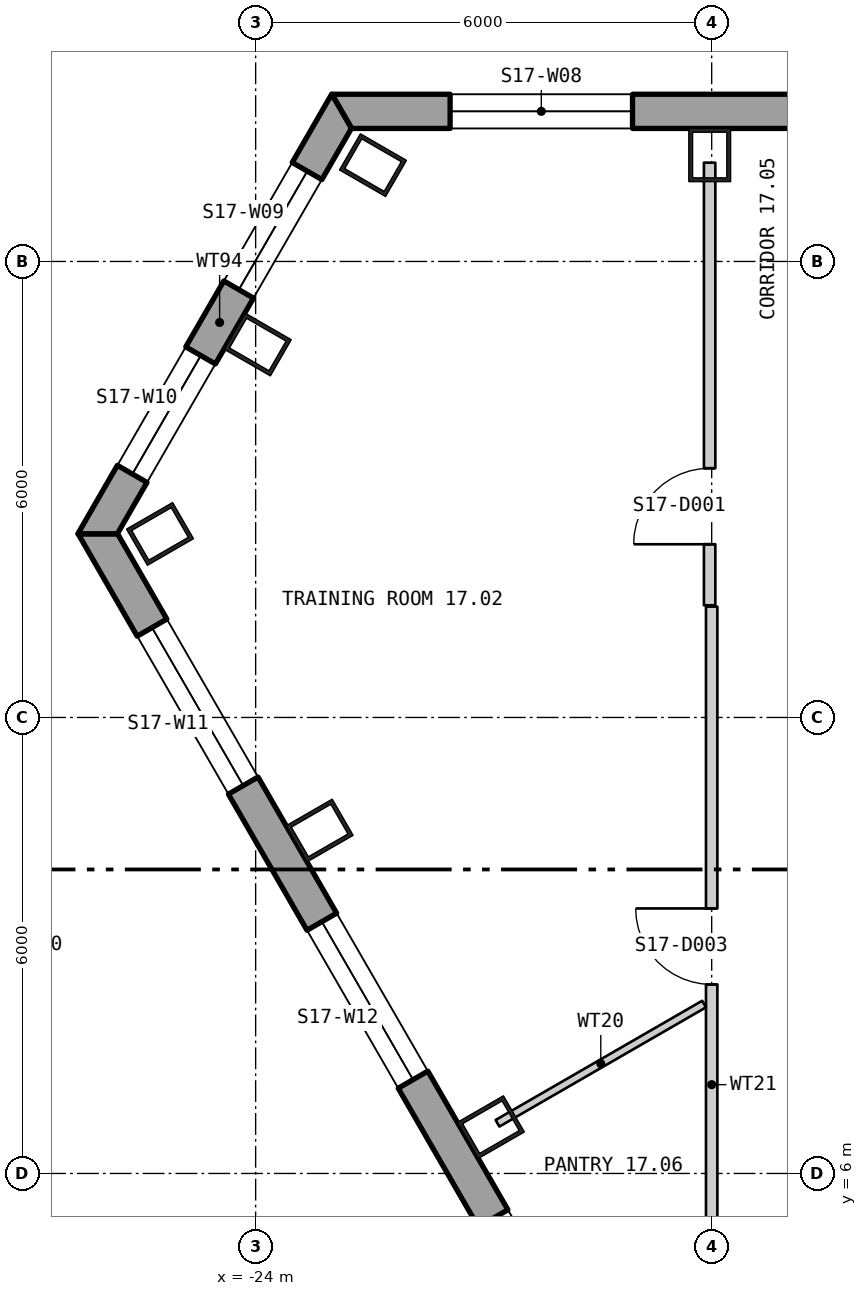
"""IFC4 building model, lengths in metres.
Left out: names, types, materials, properties, quantities, classifications, styles, units other than length and angle.
Written with IfcOpenShell. Run it as: python <this file> out.ifc"""

import sys

from ifc_helpers import new_model, si_unit, direction, frame, frame_2d, origin, origin_2d, place, context, subcontext, project, spatial, polyline, rectangle, hollow_rectangle, outline, extrude, element, fill, save


model = new_model("IFC4")
c1 = context("Model", 3, precision=1e-05, world=origin(), true_north=direction((0.0, 1.0)))
c2 = subcontext(c1, "Body", "Model", "MODEL_VIEW")
j1 = project(units=[si_unit("LENGTHUNIT", "METRE"), si_unit("PLANEANGLEUNIT", "RADIAN")], contexts=[c1])
p1 = place(None, origin())
s1 = spatial("IfcSite", under=j1, at=p1, CompositionType="ELEMENT")
p2 = place(p1, origin())
s2 = spatial("IfcBuilding", under=s1, at=p2, CompositionType="ELEMENT")
p3 = place(p2, frame((0.0, 0.0, 227.7)))
s3 = spatial("IfcBuildingStorey", under=s2, at=p3, CompositionType="ELEMENT", Elevation=227.7)
for number, where, z_axis, x_axis in (
    (1, (-18.026, 19.4, 0.0), (0.0, 0.0, 1.0), (-1.0, 0.0, 0.0)),
    (2, (-22.456, 19.267, 0.0), (0.0, 0.0, 1.0), (-0.5, -0.866, 0.0)),
    (3, (-23.972, 16.907, 0.0), (0.0, 0.0, 1.0), (-0.5, -0.866, 0.0)),
    (4, (-25.258, 14.415, 0.0), (0.0, 0.0, 1.0), (0.5, -0.866, 0.0)),
    (5, (-23.158, 10.512, 0.0), (0.0, 0.0, 1.0), (0.5, -0.866, 0.0)),
    (6, (-20.905, 6.609, 0.0), (0.0, 0.0, 1.0), (0.5, -0.866, 0.0)),
):
    element("IfcColumn", number, at=place(p3, frame(where, z_axis=z_axis, x_axis=x_axis)), inside=s3, PredefinedType="COLUMN", context=c2, shape_type="SweptSolid", body=[
        extrude(hollow_rectangle(XDim=0.55, YDim=0.7, WallThickness=0.05, at=origin_2d()), origin(), (0.0, 0.0, 1.0), 3.9),
    ])
p4 = place(p3, frame((22.865, 19.975, -0.4), z_axis=(0.0, 0.0, 1.0), x_axis=(-1.0, 0.0, 0.0)))
e7 = element("IfcWall", 7, at=p4, inside=s3, PredefinedType="SOLIDWALL", context=c2, shape_type="SweptSolid", body=[
    extrude(outline(polyline([(-0.13, -0.225), (45.86, -0.225), (45.6, 0.225), (0.13, 0.225), (-0.13, -0.225)])), origin(), (0.0, 0.0, 1.0), 3.9),
])
p5 = place(p4, frame((1.424, 0.0, 1.3)))
e8 = element("IfcOpeningElement", 8, at=p5, cuts=e7, PredefinedType="OPENING", context=c2, shape_type="SweptSolid", body=[
    extrude(rectangle(XDim=2.4, YDim=2.0, at=frame_2d((1.2, 1.0))), frame((0.0, 0.235, 0.0), z_axis=(0.0, -1.0, 0.0), x_axis=(1.0, 0.0, 0.0)), (0.0, 0.0, 1.0), 0.47),
])
p6 = place(p4, frame((10.399, 0.0, 1.3)))
e9 = element("IfcOpeningElement", 9, at=p6, cuts=e7, PredefinedType="OPENING", context=c2, shape_type="SweptSolid", body=[
    extrude(rectangle(XDim=2.4, YDim=2.0, at=frame_2d((1.2, 1.0))), frame((0.0, 0.235, 0.0), z_axis=(0.0, -1.0, 0.0), x_axis=(1.0, 0.0, 0.0)), (0.0, 0.0, 1.0), 0.47),
])
p7 = place(p4, frame((14.905, 0.0, 1.3)))
e10 = element("IfcOpeningElement", 10, at=p7, cuts=e7, PredefinedType="OPENING", context=c2, shape_type="SweptSolid", body=[
    extrude(rectangle(XDim=2.4, YDim=2.0, at=frame_2d((1.2, 1.0))), frame((0.0, 0.235, 0.0), z_axis=(0.0, -1.0, 0.0), x_axis=(1.0, 0.0, 0.0)), (0.0, 0.0, 1.0), 0.47),
])
p8 = place(p4, frame((19.412, 0.0, 1.3)))
e11 = element("IfcOpeningElement", 11, at=p8, cuts=e7, PredefinedType="OPENING", context=c2, shape_type="SweptSolid", body=[
    extrude(rectangle(XDim=2.4, YDim=2.0, at=frame_2d((1.2, 1.0))), frame((0.0, 0.235, 0.0), z_axis=(0.0, -1.0, 0.0), x_axis=(1.0, 0.0, 0.0)), (0.0, 0.0, 1.0), 0.47),
])
p9 = place(p4, frame((23.918, 0.0, 1.3)))
e12 = element("IfcOpeningElement", 12, at=p9, cuts=e7, PredefinedType="OPENING", context=c2, shape_type="SweptSolid", body=[
    extrude(rectangle(XDim=2.4, YDim=2.0, at=frame_2d((1.2, 1.0))), frame((0.0, 0.235, 0.0), z_axis=(0.0, -1.0, 0.0), x_axis=(1.0, 0.0, 0.0)), (0.0, 0.0, 1.0), 0.47),
])
p10 = place(p4, frame((28.425, 0.0, 1.3)))
e13 = element("IfcOpeningElement", 13, at=p10, cuts=e7, PredefinedType="OPENING", context=c2, shape_type="SweptSolid", body=[
    extrude(rectangle(XDim=2.4, YDim=2.0, at=frame_2d((1.2, 1.0))), frame((0.0, 0.235, 0.0), z_axis=(0.0, -1.0, 0.0), x_axis=(1.0, 0.0, 0.0)), (0.0, 0.0, 1.0), 0.47),
])
p11 = place(p4, frame((32.932, 0.0, 1.3)))
e14 = element("IfcOpeningElement", 14, at=p11, cuts=e7, PredefinedType="OPENING", context=c2, shape_type="SweptSolid", body=[
    extrude(rectangle(XDim=2.4, YDim=2.0, at=frame_2d((1.2, 1.0))), frame((0.0, 0.235, 0.0), z_axis=(0.0, -1.0, 0.0), x_axis=(1.0, 0.0, 0.0)), (0.0, 0.0, 1.0), 0.47),
])
p12 = place(p4, frame((41.907, 0.0, 1.3)))
e15 = element("IfcOpeningElement", 15, at=p12, cuts=e7, PredefinedType="OPENING", context=c2, shape_type="SweptSolid", body=[
    extrude(rectangle(XDim=2.4, YDim=2.0, at=frame_2d((1.2, 1.0))), frame((0.0, 0.235, 0.0), z_axis=(0.0, -1.0, 0.0), x_axis=(1.0, 0.0, 0.0)), (0.0, 0.0, 1.0), 0.47),
])
p13 = place(p3, frame((-22.869, 19.977, -0.4), z_axis=(0.0, 0.0, 1.0), x_axis=(-0.499997052475, -0.866027105532, 0.0)))
e16 = element("IfcWall", 16, at=p13, inside=s3, PredefinedType="SOLIDWALL", context=c2, shape_type="SweptSolid", body=[
    extrude(outline(polyline([(-0.13, -0.225), (6.55, -0.225), (6.29, 0.225), (0.13, 0.225), (-0.13, -0.225)])), origin(), (0.0, 0.0, 1.0), 3.9),
])
p14 = place(p13, frame((0.909, 0.0, 1.3)))
e17 = element("IfcOpeningElement", 17, at=p14, cuts=e16, PredefinedType="OPENING", context=c2, shape_type="SweptSolid", body=[
    extrude(rectangle(XDim=1.8, YDim=2.0, at=frame_2d((0.9, 1.0))), frame((0.0, 0.235, 0.0), z_axis=(0.0, -1.0, 0.0), x_axis=(1.0, 0.0, 0.0)), (0.0, 0.0, 1.0), 0.47),
])
p15 = place(p13, frame((3.711, 0.0, 1.3)))
e18 = element("IfcOpeningElement", 18, at=p15, cuts=e16, PredefinedType="OPENING", context=c2, shape_type="SweptSolid", body=[
    extrude(rectangle(XDim=1.8, YDim=2.0, at=frame_2d((0.9, 1.0))), frame((0.0, 0.235, 0.0), z_axis=(0.0, -1.0, 0.0), x_axis=(1.0, 0.0, 0.0)), (0.0, 0.0, 1.0), 0.47),
])
p16 = place(p3, frame((-26.075, 14.415, -0.18), z_axis=(0.0, 0.0, 1.0), x_axis=(0.499999194392, -0.866025868902, 0.0)))
e19 = element("IfcWall", 19, at=p16, inside=s3, PredefinedType="SOLIDWALL", context=c2, shape_type="SweptSolid", body=[
    extrude(outline(polyline([(-0.13, -0.225), (45.86, -0.225), (45.6, 0.225), (0.13, 0.225), (-0.13, -0.225)])), origin(), (0.0, 0.0, 1.0), 3.68),
])
p17 = place(p16, frame((1.424, 0.0, 1.08)))
e20 = element("IfcOpeningElement", 20, at=p17, cuts=e19, PredefinedType="OPENING", context=c2, shape_type="SweptSolid", body=[
    extrude(rectangle(XDim=2.4, YDim=2.0, at=frame_2d((1.2, 1.0))), frame((0.0, 0.235, 0.0), z_axis=(0.0, -1.0, 0.0), x_axis=(1.0, 0.0, 0.0)), (0.0, 0.0, 1.0), 0.47),
])
p18 = place(p16, frame((5.892, 0.0, 1.08)))
e21 = element("IfcOpeningElement", 21, at=p18, cuts=e19, PredefinedType="OPENING", context=c2, shape_type="SweptSolid", body=[
    extrude(rectangle(XDim=2.4, YDim=2.0, at=frame_2d((1.2, 1.0))), frame((0.0, 0.235, 0.0), z_axis=(0.0, -1.0, 0.0), x_axis=(1.0, 0.0, 0.0)), (0.0, 0.0, 1.0), 0.47),
])
p19 = place(p16, frame((10.399, 0.0, 1.08)))
e22 = element("IfcOpeningElement", 22, at=p19, cuts=e19, PredefinedType="OPENING", context=c2, shape_type="SweptSolid", body=[
    extrude(rectangle(XDim=2.4, YDim=2.0, at=frame_2d((1.2, 1.0))), frame((0.0, 0.235, 0.0), z_axis=(0.0, -1.0, 0.0), x_axis=(1.0, 0.0, 0.0)), (0.0, 0.0, 1.0), 0.47),
])
p20 = place(p16, frame((19.412, 0.0, 1.08)))
e23 = element("IfcOpeningElement", 23, at=p20, cuts=e19, PredefinedType="OPENING", context=c2, shape_type="SweptSolid", body=[
    extrude(rectangle(XDim=2.4, YDim=2.0, at=frame_2d((1.2, 1.0))), frame((0.0, 0.235, 0.0), z_axis=(0.0, -1.0, 0.0), x_axis=(1.0, 0.0, 0.0)), (0.0, 0.0, 1.0), 0.47),
])
p21 = place(p16, frame((23.918, 0.0, 1.08)))
e24 = element("IfcOpeningElement", 24, at=p21, cuts=e19, PredefinedType="OPENING", context=c2, shape_type="SweptSolid", body=[
    extrude(rectangle(XDim=2.4, YDim=2.0, at=frame_2d((1.2, 1.0))), frame((0.0, 0.235, 0.0), z_axis=(0.0, -1.0, 0.0), x_axis=(1.0, 0.0, 0.0)), (0.0, 0.0, 1.0), 0.47),
])
p22 = place(p16, frame((28.425, 0.0, 1.08)))
e25 = element("IfcOpeningElement", 25, at=p22, cuts=e19, PredefinedType="OPENING", context=c2, shape_type="SweptSolid", body=[
    extrude(rectangle(XDim=2.4, YDim=2.0, at=frame_2d((1.2, 1.0))), frame((0.0, 0.235, 0.0), z_axis=(0.0, -1.0, 0.0), x_axis=(1.0, 0.0, 0.0)), (0.0, 0.0, 1.0), 0.47),
])
p23 = place(p16, frame((32.932, 0.0, 1.08)))
e26 = element("IfcOpeningElement", 26, at=p23, cuts=e19, PredefinedType="OPENING", context=c2, shape_type="SweptSolid", body=[
    extrude(rectangle(XDim=2.4, YDim=2.0, at=frame_2d((1.2, 1.0))), frame((0.0, 0.235, 0.0), z_axis=(0.0, -1.0, 0.0), x_axis=(1.0, 0.0, 0.0)), (0.0, 0.0, 1.0), 0.47),
])
p24 = place(p16, frame((41.907, 0.0, 1.08)))
e27 = element("IfcOpeningElement", 27, at=p24, cuts=e19, PredefinedType="OPENING", context=c2, shape_type="SweptSolid", body=[
    extrude(rectangle(XDim=2.4, YDim=2.0, at=frame_2d((1.2, 1.0))), frame((0.0, 0.235, 0.0), z_axis=(0.0, -1.0, 0.0), x_axis=(1.0, 0.0, 0.0)), (0.0, 0.0, 1.0), 0.47),
])
p25 = place(p3, frame((-20.818, 6.66, 0.0), z_axis=(0.0, 0.0, 1.0), x_axis=(0.866058244174, 0.499943114462, 0.0)))
e28 = element("IfcWall", 28, at=p25, inside=s3, PredefinedType="PARTITIONING", context=c2, shape_type="SweptSolid", body=[
    extrude(rectangle(XDim=3.138, YDim=0.1, at=frame_2d((1.569, 0.0))), origin(), (0.0, 0.0, 1.0), 3.7),
])
p26 = place(p3, frame((-18.027, 13.476, 0.0), z_axis=(0.0, 0.0, 1.0), x_axis=(0.0, 1.0, 0.0)))
e29 = element("IfcWall", 29, at=p26, inside=s3, PredefinedType="PARTITIONING", context=c2, shape_type="SweptSolid", body=[
    extrude(rectangle(XDim=5.824, YDim=0.15, at=frame_2d((2.912, 0.0))), origin(), (0.0, 0.0, 1.0), 3.7),
])
p27 = place(p26, frame((0.803, 0.0, 0.0)))
e30 = element("IfcOpeningElement", 30, at=p27, cuts=e29, PredefinedType="OPENING", context=c2, shape_type="SweptSolid", body=[
    extrude(rectangle(XDim=1.0, YDim=2.1, at=frame_2d((0.5, 1.05))), frame((0.0, 0.085, 0.0), z_axis=(0.0, -1.0, 0.0), x_axis=(1.0, 0.0, 0.0)), (0.0, 0.0, 1.0), 0.17),
])
p28 = place(p3, frame((-18.0, 0.879, 0.0), z_axis=(0.0, 0.0, 1.0), x_axis=(0.0, 1.0, 0.0)))
e31 = element("IfcWall", 31, at=p28, inside=s3, PredefinedType="PARTITIONING", context=c2, shape_type="SweptSolid", body=[
    extrude(rectangle(XDim=12.579, YDim=0.15, at=frame_2d((6.29, 0.0))), origin(), (0.0, 0.0, 1.0), 3.7),
])
p29 = place(p28, frame((3.103, 0.0, 0.0)))
e32 = element("IfcOpeningElement", 32, at=p29, cuts=e31, PredefinedType="OPENING", context=c2, shape_type="SweptSolid", body=[
    extrude(rectangle(XDim=1.0, YDim=2.1, at=frame_2d((0.5, 1.05))), frame((0.0, 0.085, 0.0), z_axis=(0.0, -1.0, 0.0), x_axis=(1.0, 0.0, 0.0)), (0.0, 0.0, 1.0), 0.17),
])
p30 = place(p28, frame((7.608, 0.0, 0.0)))
e33 = element("IfcOpeningElement", 33, at=p30, cuts=e31, PredefinedType="OPENING", context=c2, shape_type="SweptSolid", body=[
    extrude(rectangle(XDim=1.0, YDim=2.1, at=frame_2d((0.5, 1.05))), frame((0.0, 0.085, 0.0), z_axis=(0.0, -1.0, 0.0), x_axis=(1.0, 0.0, 0.0)), (0.0, 0.0, 1.0), 0.17),
])
p31 = place(p12, origin())
e34 = element("IfcWindow", 34, at=p31, inside=s3, PartitioningType="SINGLE_PANEL", PredefinedType="WINDOW", context=c2, shape_type="SweptSolid", body=[
    extrude(rectangle(XDim=2.4, YDim=2.0, at=frame_2d((1.2, 1.0))), frame((0.0, 0.105, 0.0), z_axis=(0.0, -1.0, 0.0), x_axis=(1.0, 0.0, 0.0)), (0.0, 0.0, 1.0), 0.06),
])
fill(e15, e34)
p32 = place(p14, origin())
e35 = element("IfcWindow", 35, at=p32, inside=s3, PartitioningType="SINGLE_PANEL", PredefinedType="WINDOW", context=c2, shape_type="SweptSolid", body=[
    extrude(rectangle(XDim=1.8, YDim=2.0, at=frame_2d((0.9, 1.0))), frame((0.0, 0.105, 0.0), z_axis=(0.0, -1.0, 0.0), x_axis=(1.0, 0.0, 0.0)), (0.0, 0.0, 1.0), 0.06),
])
fill(e17, e35)
p33 = place(p15, origin())
e36 = element("IfcWindow", 36, at=p33, inside=s3, PartitioningType="SINGLE_PANEL", PredefinedType="WINDOW", context=c2, shape_type="SweptSolid", body=[
    extrude(rectangle(XDim=1.8, YDim=2.0, at=frame_2d((0.9, 1.0))), frame((0.0, 0.105, 0.0), z_axis=(0.0, -1.0, 0.0), x_axis=(1.0, 0.0, 0.0)), (0.0, 0.0, 1.0), 0.06),
])
fill(e18, e36)
p34 = place(p17, origin())
e37 = element("IfcWindow", 37, at=p34, inside=s3, PartitioningType="SINGLE_PANEL", PredefinedType="WINDOW", context=c2, shape_type="SweptSolid", body=[
    extrude(rectangle(XDim=2.4, YDim=2.0, at=frame_2d((1.2, 1.0))), frame((0.0, 0.105, 0.0), z_axis=(0.0, -1.0, 0.0), x_axis=(1.0, 0.0, 0.0)), (0.0, 0.0, 1.0), 0.06),
])
fill(e20, e37)
p35 = place(p18, origin())
e38 = element("IfcWindow", 38, at=p35, inside=s3, PartitioningType="SINGLE_PANEL", PredefinedType="WINDOW", context=c2, shape_type="SweptSolid", body=[
    extrude(rectangle(XDim=2.4, YDim=2.0, at=frame_2d((1.2, 1.0))), frame((0.0, 0.105, 0.0), z_axis=(0.0, -1.0, 0.0), x_axis=(1.0, 0.0, 0.0)), (0.0, 0.0, 1.0), 0.06),
])
fill(e21, e38)
p36 = place(p19, origin())
e39 = element("IfcWindow", 39, at=p36, inside=s3, PartitioningType="SINGLE_PANEL", PredefinedType="WINDOW", context=c2, shape_type="SweptSolid", body=[
    extrude(rectangle(XDim=2.4, YDim=2.0, at=frame_2d((1.2, 1.0))), frame((0.0, 0.105, 0.0), z_axis=(0.0, -1.0, 0.0), x_axis=(1.0, 0.0, 0.0)), (0.0, 0.0, 1.0), 0.06),
])
fill(e22, e39)
p37 = place(p27, origin())
e40 = element("IfcDoor", 40, at=p37, inside=s3, OperationType="SINGLE_SWING_RIGHT", PredefinedType="DOOR", context=c2, shape_type="SweptSolid", body=[
    extrude(rectangle(XDim=1.0, YDim=2.1, at=frame_2d((0.5, 1.05))), frame((0.0, 0.025, 0.0), z_axis=(0.0, -1.0, 0.0), x_axis=(1.0, 0.0, 0.0)), (0.0, 0.0, 1.0), 0.05),
])
fill(e30, e40)
p38 = place(p30, origin())
e41 = element("IfcDoor", 41, at=p38, inside=s3, OperationType="SINGLE_SWING_LEFT", PredefinedType="DOOR", context=c2, shape_type="SweptSolid", body=[
    extrude(rectangle(XDim=1.0, YDim=2.1, at=frame_2d((0.5, 1.05))), frame((0.0, 0.025, 0.0), z_axis=(0.0, -1.0, 0.0), x_axis=(1.0, 0.0, 0.0)), (0.0, 0.0, 1.0), 0.05),
])
fill(e33, e41)
save(model, sys.argv[1])
